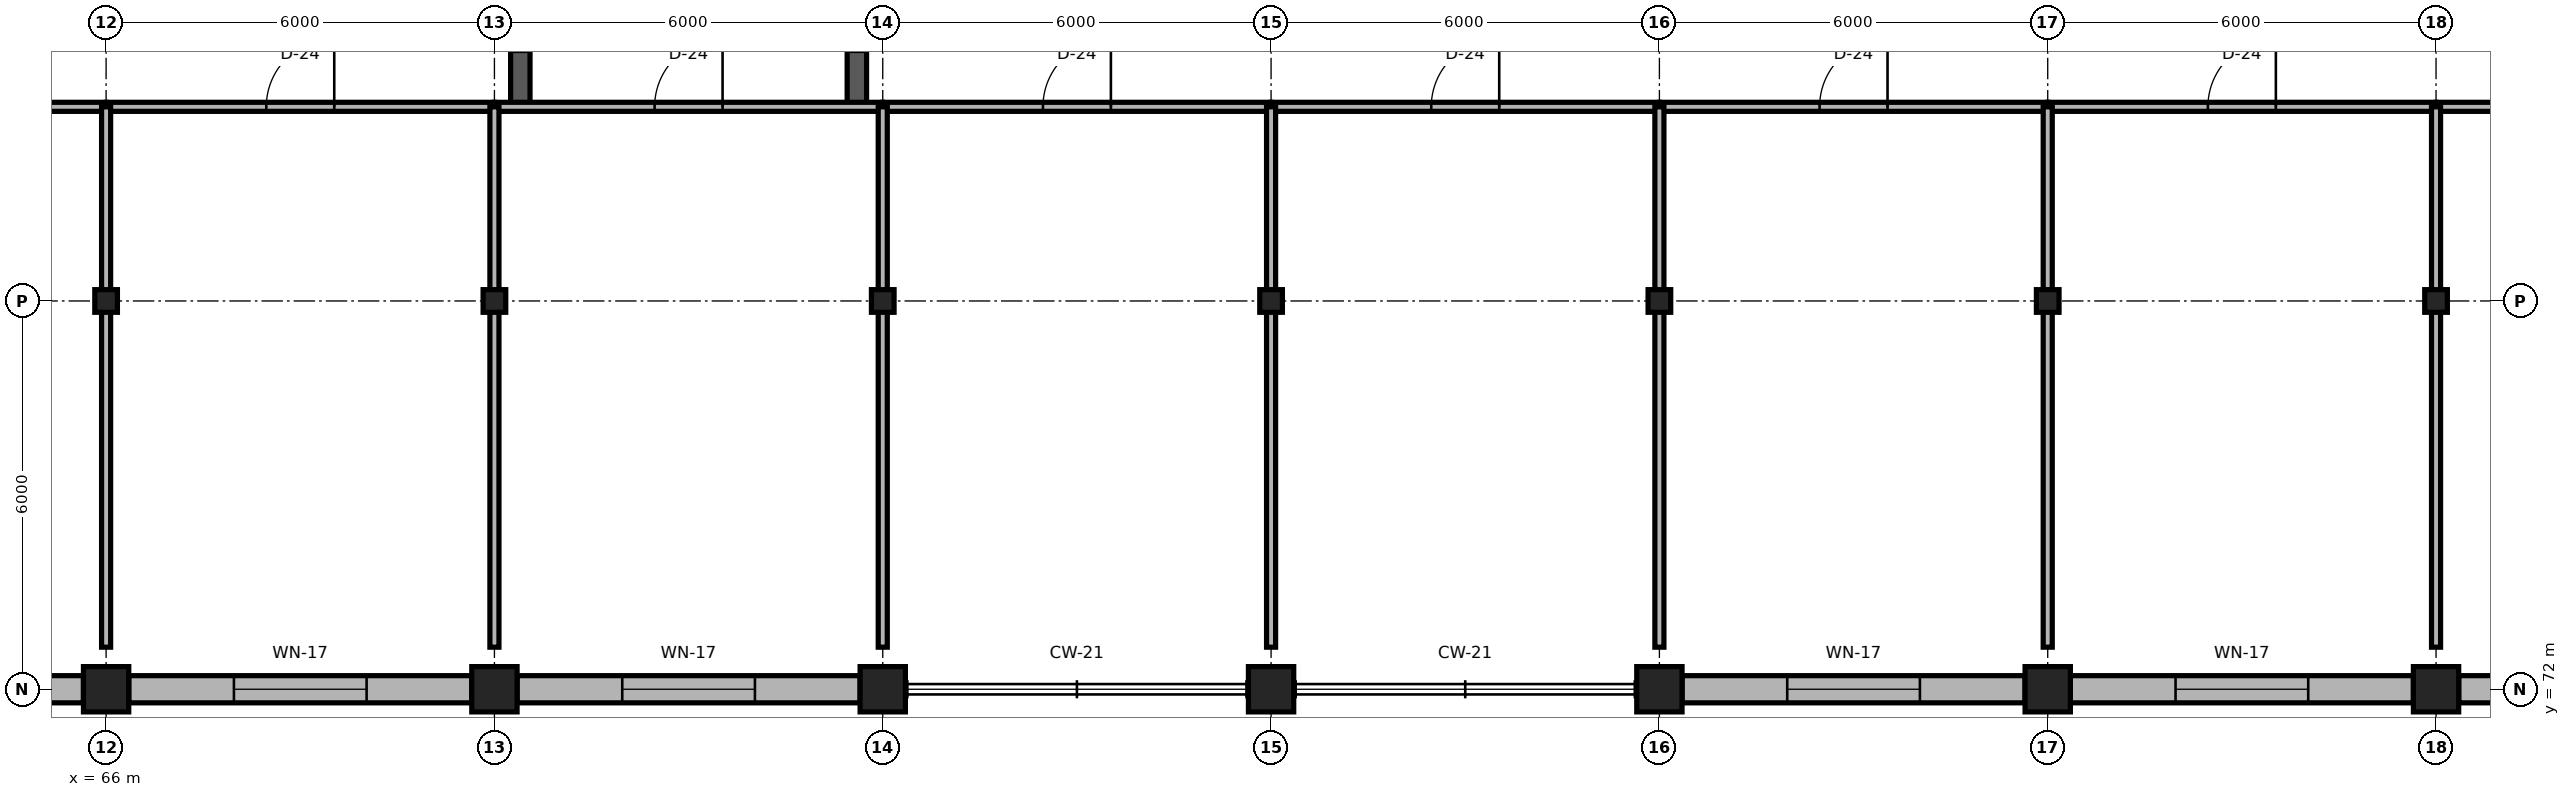
"""IFC4 building model, lengths in metres.
Left out: names, types, materials, properties, quantities, classifications, styles, units other than length and angle.
Written with IfcOpenShell. Run it as: python <this file> out.ifc"""

import sys

from ifc_helpers import new_model, si_unit, direction, frame, frame_2d, origin, origin_2d, place, context, subcontext, project, spatial, rectangle, i_section, extrude, element, fill, save


model = new_model("IFC4")
c1 = context("Model", 3, precision=1e-05, world=origin(), true_north=direction((0.0, 1.0)))
c2 = subcontext(c1, "Body", "Model", "MODEL_VIEW")
j1 = project(units=[si_unit("LENGTHUNIT", "METRE"), si_unit("PLANEANGLEUNIT", "RADIAN")], contexts=[c1])
p1 = place(None, origin())
s1 = spatial("IfcSite", under=j1, at=p1, CompositionType="ELEMENT")
p2 = place(p1, origin())
s2 = spatial("IfcBuilding", under=s1, at=p2, CompositionType="ELEMENT")
p3 = place(p2, frame((0.0, 0.0, 36.6)))
s3 = spatial("IfcBuildingStorey", under=s2, at=p3, CompositionType="ELEMENT", Elevation=36.6)
for number, where, z_axis, x_axis in (
    (1, (66.0, 72.0, 0.0), (0.0, 0.0, 1.0), (1.0, 0.0, 0.0)),
    (2, (72.0, 72.0, 0.0), (0.0, 0.0, 1.0), (1.0, 0.0, 0.0)),
    (3, (78.0, 72.0, 0.0), (0.0, 0.0, 1.0), (1.0, 0.0, 0.0)),
    (4, (84.0, 72.0, 0.0), (0.0, 0.0, 1.0), (1.0, 0.0, 0.0)),
    (5, (90.0, 72.0, 0.0), (0.0, 0.0, 1.0), (1.0, 0.0, 0.0)),
    (6, (96.0, 72.0, 0.0), (0.0, 0.0, 1.0), (1.0, 0.0, 0.0)),
    (7, (102.0, 72.0, 0.0), (0.0, 0.0, 1.0), (1.0, 0.0, 0.0)),
):
    element("IfcColumn", number, at=place(p3, frame(where, z_axis=z_axis, x_axis=x_axis)), inside=s3, PredefinedType="COLUMN", context=c2, shape_type="SweptSolid", body=[
        extrude(rectangle(XDim=0.7, YDim=0.7, at=origin_2d()), origin(), (0.0, 0.0, 1.0), 3.9),
    ])
for number, where, z_axis, x_axis in (
    (8, (66.0, 78.0, 0.0), (0.0, 0.0, 1.0), (1.0, 0.0, 0.0)),
    (9, (72.0, 78.0, 0.0), (0.0, 0.0, 1.0), (1.0, 0.0, 0.0)),
    (10, (78.0, 78.0, 0.0), (0.0, 0.0, 1.0), (1.0, 0.0, 0.0)),
    (11, (84.0, 78.0, 0.0), (0.0, 0.0, 1.0), (1.0, 0.0, 0.0)),
    (12, (90.0, 78.0, 0.0), (0.0, 0.0, 1.0), (1.0, 0.0, 0.0)),
    (13, (96.0, 78.0, 0.0), (0.0, 0.0, 1.0), (1.0, 0.0, 0.0)),
    (14, (102.0, 78.0, 0.0), (0.0, 0.0, 1.0), (1.0, 0.0, 0.0)),
):
    element("IfcColumn", number, at=place(p3, frame(where, z_axis=z_axis, x_axis=x_axis)), inside=s3, PredefinedType="COLUMN", context=c2, shape_type="SweptSolid", body=[
        extrude(i_section(OverallWidth=0.35, OverallDepth=0.35, WebThickness=0.012, FlangeThickness=0.019, FilletRadius=0.02, at=origin_2d()), origin(), (0.0, 0.0, 1.0), 3.9),
    ])
p4 = place(p3, frame((60.35, 72.0, 0.0), z_axis=(0.0, 0.0, 1.0), x_axis=(1.0, 0.0, 0.0)))
e15 = element("IfcWall", 15, at=p4, inside=s3, PredefinedType="SOLIDWALL", context=c2, shape_type="SweptSolid", body=[
    extrude(rectangle(XDim=5.3, YDim=0.42, at=frame_2d((2.65, 0.0))), origin(), (0.0, 0.0, 1.0), 3.32),
])
p5 = place(p4, frame((1.625, 0.0, 0.85)))
e16 = element("IfcOpeningElement", 16, at=p5, cuts=e15, PredefinedType="OPENING", context=c2, shape_type="SweptSolid", body=[
    extrude(rectangle(XDim=2.05, YDim=2.0, at=frame_2d((1.025, 1.0))), frame((0.0, 0.225, 0.0), z_axis=(0.0, -1.0, 0.0), x_axis=(1.0, 0.0, 0.0)), (0.0, 0.0, 1.0), 0.45),
])
p6 = place(p3, frame((66.35, 72.0, 0.0), z_axis=(0.0, 0.0, 1.0), x_axis=(1.0, 0.0, 0.0)))
e17 = element("IfcWall", 17, at=p6, inside=s3, PredefinedType="SOLIDWALL", context=c2, shape_type="SweptSolid", body=[
    extrude(rectangle(XDim=5.3, YDim=0.42, at=frame_2d((2.65, 0.0))), origin(), (0.0, 0.0, 1.0), 3.32),
])
p7 = place(p6, frame((1.625, 0.0, 0.85)))
e18 = element("IfcOpeningElement", 18, at=p7, cuts=e17, PredefinedType="OPENING", context=c2, shape_type="SweptSolid", body=[
    extrude(rectangle(XDim=2.05, YDim=2.0, at=frame_2d((1.025, 1.0))), frame((0.0, 0.225, 0.0), z_axis=(0.0, -1.0, 0.0), x_axis=(1.0, 0.0, 0.0)), (0.0, 0.0, 1.0), 0.45),
])
p8 = place(p3, frame((72.35, 72.0, 0.0), z_axis=(0.0, 0.0, 1.0), x_axis=(1.0, 0.0, 0.0)))
e19 = element("IfcWall", 19, at=p8, inside=s3, PredefinedType="SOLIDWALL", context=c2, shape_type="SweptSolid", body=[
    extrude(rectangle(XDim=5.3, YDim=0.42, at=frame_2d((2.65, 0.0))), origin(), (0.0, 0.0, 1.0), 3.32),
])
p9 = place(p8, frame((1.625, 0.0, 0.85)))
e20 = element("IfcOpeningElement", 20, at=p9, cuts=e19, PredefinedType="OPENING", context=c2, shape_type="SweptSolid", body=[
    extrude(rectangle(XDim=2.05, YDim=2.0, at=frame_2d((1.025, 1.0))), frame((0.0, 0.225, 0.0), z_axis=(0.0, -1.0, 0.0), x_axis=(1.0, 0.0, 0.0)), (0.0, 0.0, 1.0), 0.45),
])
p10 = place(p3, frame((90.35, 72.0, 0.0), z_axis=(0.0, 0.0, 1.0), x_axis=(1.0, 0.0, 0.0)))
e21 = element("IfcWall", 21, at=p10, inside=s3, PredefinedType="SOLIDWALL", context=c2, shape_type="SweptSolid", body=[
    extrude(rectangle(XDim=5.3, YDim=0.42, at=frame_2d((2.65, 0.0))), origin(), (0.0, 0.0, 1.0), 3.32),
])
p11 = place(p10, frame((1.625, 0.0, 0.85)))
e22 = element("IfcOpeningElement", 22, at=p11, cuts=e21, PredefinedType="OPENING", context=c2, shape_type="SweptSolid", body=[
    extrude(rectangle(XDim=2.05, YDim=2.0, at=frame_2d((1.025, 1.0))), frame((0.0, 0.225, 0.0), z_axis=(0.0, -1.0, 0.0), x_axis=(1.0, 0.0, 0.0)), (0.0, 0.0, 1.0), 0.45),
])
p12 = place(p3, frame((96.35, 72.0, 0.0), z_axis=(0.0, 0.0, 1.0), x_axis=(1.0, 0.0, 0.0)))
e23 = element("IfcWall", 23, at=p12, inside=s3, PredefinedType="SOLIDWALL", context=c2, shape_type="SweptSolid", body=[
    extrude(rectangle(XDim=5.3, YDim=0.42, at=frame_2d((2.65, 0.0))), origin(), (0.0, 0.0, 1.0), 3.32),
])
p13 = place(p12, frame((1.625, 0.0, 0.85)))
e24 = element("IfcOpeningElement", 24, at=p13, cuts=e23, PredefinedType="OPENING", context=c2, shape_type="SweptSolid", body=[
    extrude(rectangle(XDim=2.05, YDim=2.0, at=frame_2d((1.025, 1.0))), frame((0.0, 0.225, 0.0), z_axis=(0.0, -1.0, 0.0), x_axis=(1.0, 0.0, 0.0)), (0.0, 0.0, 1.0), 0.45),
])
p14 = place(p3, frame((102.35, 72.0, 0.0), z_axis=(0.0, 0.0, 1.0), x_axis=(1.0, 0.0, 0.0)))
e25 = element("IfcWall", 25, at=p14, inside=s3, PredefinedType="SOLIDWALL", context=c2, shape_type="SweptSolid", body=[
    extrude(rectangle(XDim=5.3, YDim=0.42, at=frame_2d((2.65, 0.0))), origin(), (0.0, 0.0, 1.0), 3.32),
])
p15 = place(p14, frame((1.625, 0.0, 0.85)))
e26 = element("IfcOpeningElement", 26, at=p15, cuts=e25, PredefinedType="OPENING", context=c2, shape_type="SweptSolid", body=[
    extrude(rectangle(XDim=2.05, YDim=2.0, at=frame_2d((1.025, 1.0))), frame((0.0, 0.225, 0.0), z_axis=(0.0, -1.0, 0.0), x_axis=(1.0, 0.0, 0.0)), (0.0, 0.0, 1.0), 0.45),
])
p16 = place(p3, frame((72.4, 81.0, 0.0), z_axis=(0.0, 0.0, 1.0), x_axis=(0.0, 1.0, 0.0)))
e27 = element("IfcWall", 27, at=p16, inside=s3, PredefinedType="SHEAR", context=c2, shape_type="SweptSolid", body=[
    extrude(rectangle(XDim=3.0, YDim=0.3, at=frame_2d((1.5, 0.0))), origin(), (0.0, 0.0, 1.0), 3.74),
])
p17 = place(p16, frame((0.85, 0.0, 0.0)))
e28 = element("IfcOpeningElement", 28, at=p17, cuts=e27, PredefinedType="OPENING", context=c2, shape_type="SweptSolid", body=[
    extrude(rectangle(XDim=1.3, YDim=2.2, at=frame_2d((0.65, 1.1))), frame((0.0, 0.165, 0.0), z_axis=(0.0, -1.0, 0.0), x_axis=(1.0, 0.0, 0.0)), (0.0, 0.0, 1.0), 0.33),
])
p18 = place(p3, frame((77.6, 81.0, 0.0), z_axis=(0.0, 0.0, 1.0), x_axis=(0.0, 1.0, 0.0)))
e29 = element("IfcWall", 29, at=p18, inside=s3, PredefinedType="SHEAR", context=c2, shape_type="SweptSolid", body=[
    extrude(rectangle(XDim=3.0, YDim=0.3, at=frame_2d((1.5, 0.0))), origin(), (0.0, 0.0, 1.0), 3.74),
])
p19 = place(p18, frame((0.85, 0.0, 0.0)))
e30 = element("IfcOpeningElement", 30, at=p19, cuts=e29, PredefinedType="OPENING", context=c2, shape_type="SweptSolid", body=[
    extrude(rectangle(XDim=1.3, YDim=2.2, at=frame_2d((0.65, 1.1))), frame((0.0, 0.165, 0.0), z_axis=(0.0, -1.0, 0.0), x_axis=(1.0, 0.0, 0.0)), (0.0, 0.0, 1.0), 0.33),
])
p20 = place(p3, frame((61.7, 81.0, 0.0), z_axis=(0.0, 0.0, 1.0), x_axis=(1.0, 0.0, 0.0)))
e31 = element("IfcWall", 31, at=p20, inside=s3, PredefinedType="PARTITIONING", context=c2, shape_type="SweptSolid", body=[
    extrude(rectangle(XDim=4.3, YDim=0.14, at=frame_2d((2.15, 0.0))), origin(), (0.0, 0.0, 1.0), 3.74),
])
p21 = place(p20, frame((1.625, 0.0, 0.0)))
e32 = element("IfcOpeningElement", 32, at=p21, cuts=e31, PredefinedType="OPENING", context=c2, shape_type="SweptSolid", body=[
    extrude(rectangle(XDim=1.05, YDim=2.25, at=frame_2d((0.525, 1.125))), frame((0.0, 0.085, 0.0), z_axis=(0.0, -1.0, 0.0), x_axis=(1.0, 0.0, 0.0)), (0.0, 0.0, 1.0), 0.17),
])
p22 = place(p3, frame((66.0, 81.0, 0.0), z_axis=(0.0, 0.0, 1.0), x_axis=(1.0, 0.0, 0.0)))
e33 = element("IfcWall", 33, at=p22, inside=s3, PredefinedType="PARTITIONING", context=c2, shape_type="SweptSolid", body=[
    extrude(rectangle(XDim=6.0, YDim=0.14, at=frame_2d((3.0, 0.0))), origin(), (0.0, 0.0, 1.0), 3.74),
])
p23 = place(p22, frame((2.475, 0.0, 0.0)))
e34 = element("IfcOpeningElement", 34, at=p23, cuts=e33, PredefinedType="OPENING", context=c2, shape_type="SweptSolid", body=[
    extrude(rectangle(XDim=1.05, YDim=2.25, at=frame_2d((0.525, 1.125))), frame((0.0, 0.085, 0.0), z_axis=(0.0, -1.0, 0.0), x_axis=(1.0, 0.0, 0.0)), (0.0, 0.0, 1.0), 0.17),
])
p24 = place(p3, frame((72.0, 81.0, 0.0), z_axis=(0.0, 0.0, 1.0), x_axis=(1.0, 0.0, 0.0)))
e35 = element("IfcWall", 35, at=p24, inside=s3, PredefinedType="PARTITIONING", context=c2, shape_type="SweptSolid", body=[
    extrude(rectangle(XDim=6.0, YDim=0.14, at=frame_2d((3.0, 0.0))), origin(), (0.0, 0.0, 1.0), 3.74),
])
p25 = place(p24, frame((2.475, 0.0, 0.0)))
e36 = element("IfcOpeningElement", 36, at=p25, cuts=e35, PredefinedType="OPENING", context=c2, shape_type="SweptSolid", body=[
    extrude(rectangle(XDim=1.05, YDim=2.25, at=frame_2d((0.525, 1.125))), frame((0.0, 0.085, 0.0), z_axis=(0.0, -1.0, 0.0), x_axis=(1.0, 0.0, 0.0)), (0.0, 0.0, 1.0), 0.17),
])
p26 = place(p3, frame((78.0, 81.0, 0.0), z_axis=(0.0, 0.0, 1.0), x_axis=(1.0, 0.0, 0.0)))
e37 = element("IfcWall", 37, at=p26, inside=s3, PredefinedType="PARTITIONING", context=c2, shape_type="SweptSolid", body=[
    extrude(rectangle(XDim=6.0, YDim=0.14, at=frame_2d((3.0, 0.0))), origin(), (0.0, 0.0, 1.0), 3.74),
])
p27 = place(p26, frame((2.475, 0.0, 0.0)))
e38 = element("IfcOpeningElement", 38, at=p27, cuts=e37, PredefinedType="OPENING", context=c2, shape_type="SweptSolid", body=[
    extrude(rectangle(XDim=1.05, YDim=2.25, at=frame_2d((0.525, 1.125))), frame((0.0, 0.085, 0.0), z_axis=(0.0, -1.0, 0.0), x_axis=(1.0, 0.0, 0.0)), (0.0, 0.0, 1.0), 0.17),
])
p28 = place(p3, frame((84.0, 81.0, 0.0), z_axis=(0.0, 0.0, 1.0), x_axis=(1.0, 0.0, 0.0)))
e39 = element("IfcWall", 39, at=p28, inside=s3, PredefinedType="PARTITIONING", context=c2, shape_type="SweptSolid", body=[
    extrude(rectangle(XDim=6.0, YDim=0.14, at=frame_2d((3.0, 0.0))), origin(), (0.0, 0.0, 1.0), 3.74),
])
p29 = place(p28, frame((2.475, 0.0, 0.0)))
e40 = element("IfcOpeningElement", 40, at=p29, cuts=e39, PredefinedType="OPENING", context=c2, shape_type="SweptSolid", body=[
    extrude(rectangle(XDim=1.05, YDim=2.25, at=frame_2d((0.525, 1.125))), frame((0.0, 0.085, 0.0), z_axis=(0.0, -1.0, 0.0), x_axis=(1.0, 0.0, 0.0)), (0.0, 0.0, 1.0), 0.17),
])
p30 = place(p3, frame((90.0, 81.0, 0.0), z_axis=(0.0, 0.0, 1.0), x_axis=(1.0, 0.0, 0.0)))
e41 = element("IfcWall", 41, at=p30, inside=s3, PredefinedType="PARTITIONING", context=c2, shape_type="SweptSolid", body=[
    extrude(rectangle(XDim=6.0, YDim=0.14, at=frame_2d((3.0, 0.0))), origin(), (0.0, 0.0, 1.0), 3.74),
])
p31 = place(p30, frame((2.475, 0.0, 0.0)))
e42 = element("IfcOpeningElement", 42, at=p31, cuts=e41, PredefinedType="OPENING", context=c2, shape_type="SweptSolid", body=[
    extrude(rectangle(XDim=1.05, YDim=2.25, at=frame_2d((0.525, 1.125))), frame((0.0, 0.085, 0.0), z_axis=(0.0, -1.0, 0.0), x_axis=(1.0, 0.0, 0.0)), (0.0, 0.0, 1.0), 0.17),
])
p32 = place(p3, frame((96.0, 81.0, 0.0), z_axis=(0.0, 0.0, 1.0), x_axis=(1.0, 0.0, 0.0)))
e43 = element("IfcWall", 43, at=p32, inside=s3, PredefinedType="PARTITIONING", context=c2, shape_type="SweptSolid", body=[
    extrude(rectangle(XDim=6.0, YDim=0.14, at=frame_2d((3.0, 0.0))), origin(), (0.0, 0.0, 1.0), 3.74),
])
p33 = place(p32, frame((2.475, 0.0, 0.0)))
e44 = element("IfcOpeningElement", 44, at=p33, cuts=e43, PredefinedType="OPENING", context=c2, shape_type="SweptSolid", body=[
    extrude(rectangle(XDim=1.05, YDim=2.25, at=frame_2d((0.525, 1.125))), frame((0.0, 0.085, 0.0), z_axis=(0.0, -1.0, 0.0), x_axis=(1.0, 0.0, 0.0)), (0.0, 0.0, 1.0), 0.17),
])
p34 = place(p3, frame((102.0, 81.0, 0.0), z_axis=(0.0, 0.0, 1.0), x_axis=(1.0, 0.0, 0.0)))
e45 = element("IfcWall", 45, at=p34, inside=s3, PredefinedType="PARTITIONING", context=c2, shape_type="SweptSolid", body=[
    extrude(rectangle(XDim=4.3, YDim=0.14, at=frame_2d((2.15, 0.0))), origin(), (0.0, 0.0, 1.0), 3.74),
])
p35 = place(p34, frame((1.625, 0.0, 0.0)))
e46 = element("IfcOpeningElement", 46, at=p35, cuts=e45, PredefinedType="OPENING", context=c2, shape_type="SweptSolid", body=[
    extrude(rectangle(XDim=1.05, YDim=2.25, at=frame_2d((0.525, 1.125))), frame((0.0, 0.085, 0.0), z_axis=(0.0, -1.0, 0.0), x_axis=(1.0, 0.0, 0.0)), (0.0, 0.0, 1.0), 0.17),
])
for number, where, z_axis, x_axis in (
    (47, (66.0, 72.65, 0.0), (0.0, 0.0, 1.0), (0.0, 1.0, 0.0)),
    (48, (72.0, 72.65, 0.0), (0.0, 0.0, 1.0), (0.0, 1.0, 0.0)),
    (49, (78.0, 72.65, 0.0), (0.0, 0.0, 1.0), (0.0, 1.0, 0.0)),
    (50, (84.0, 72.65, 0.0), (0.0, 0.0, 1.0), (0.0, 1.0, 0.0)),
    (51, (90.0, 72.65, 0.0), (0.0, 0.0, 1.0), (0.0, 1.0, 0.0)),
    (52, (96.0, 72.65, 0.0), (0.0, 0.0, 1.0), (0.0, 1.0, 0.0)),
    (53, (102.0, 72.65, 0.0), (0.0, 0.0, 1.0), (0.0, 1.0, 0.0)),
):
    element("IfcWall", number, at=place(p3, frame(where, z_axis=z_axis, x_axis=x_axis)), inside=s3, PredefinedType="PARTITIONING", context=c2, shape_type="SweptSolid", body=[
        extrude(rectangle(XDim=8.35, YDim=0.14, at=frame_2d((4.175, 0.0))), origin(), (0.0, 0.0, 1.0), 3.348),
    ])
p36 = place(p7, origin())
e54 = element("IfcWindow", 54, at=p36, inside=s3, PartitioningType="SINGLE_PANEL", PredefinedType="WINDOW", context=c2, shape_type="SweptSolid", body=[
    extrude(rectangle(XDim=2.05, YDim=2.0, at=frame_2d((1.025, 1.0))), frame((0.0, 0.03, 0.0), z_axis=(0.0, -1.0, 0.0), x_axis=(1.0, 0.0, 0.0)), (0.0, 0.0, 1.0), 0.06),
])
fill(e18, e54)
p37 = place(p9, origin())
e55 = element("IfcWindow", 55, at=p37, inside=s3, PartitioningType="SINGLE_PANEL", PredefinedType="WINDOW", context=c2, shape_type="SweptSolid", body=[
    extrude(rectangle(XDim=2.05, YDim=2.0, at=frame_2d((1.025, 1.0))), frame((0.0, 0.03, 0.0), z_axis=(0.0, -1.0, 0.0), x_axis=(1.0, 0.0, 0.0)), (0.0, 0.0, 1.0), 0.06),
])
fill(e20, e55)
p38 = place(p11, origin())
e56 = element("IfcWindow", 56, at=p38, inside=s3, PartitioningType="SINGLE_PANEL", PredefinedType="WINDOW", context=c2, shape_type="SweptSolid", body=[
    extrude(rectangle(XDim=2.05, YDim=2.0, at=frame_2d((1.025, 1.0))), frame((0.0, 0.03, 0.0), z_axis=(0.0, -1.0, 0.0), x_axis=(1.0, 0.0, 0.0)), (0.0, 0.0, 1.0), 0.06),
])
fill(e22, e56)
p39 = place(p13, origin())
e57 = element("IfcWindow", 57, at=p39, inside=s3, PartitioningType="SINGLE_PANEL", PredefinedType="WINDOW", context=c2, shape_type="SweptSolid", body=[
    extrude(rectangle(XDim=2.05, YDim=2.0, at=frame_2d((1.025, 1.0))), frame((0.0, 0.03, 0.0), z_axis=(0.0, -1.0, 0.0), x_axis=(1.0, 0.0, 0.0)), (0.0, 0.0, 1.0), 0.06),
])
fill(e24, e57)
p40 = place(p23, origin())
e58 = element("IfcDoor", 58, at=p40, inside=s3, OperationType="SINGLE_SWING_RIGHT", PredefinedType="DOOR", context=c2, shape_type="SweptSolid", body=[
    extrude(rectangle(XDim=1.05, YDim=2.25, at=frame_2d((0.525, 1.125))), frame((0.0, 0.025, 0.0), z_axis=(0.0, -1.0, 0.0), x_axis=(1.0, 0.0, 0.0)), (0.0, 0.0, 1.0), 0.05),
])
fill(e34, e58)
p41 = place(p25, origin())
e59 = element("IfcDoor", 59, at=p41, inside=s3, OperationType="SINGLE_SWING_RIGHT", PredefinedType="DOOR", context=c2, shape_type="SweptSolid", body=[
    extrude(rectangle(XDim=1.05, YDim=2.25, at=frame_2d((0.525, 1.125))), frame((0.0, 0.025, 0.0), z_axis=(0.0, -1.0, 0.0), x_axis=(1.0, 0.0, 0.0)), (0.0, 0.0, 1.0), 0.05),
])
fill(e36, e59)
p42 = place(p27, origin())
e60 = element("IfcDoor", 60, at=p42, inside=s3, OperationType="SINGLE_SWING_RIGHT", PredefinedType="DOOR", context=c2, shape_type="SweptSolid", body=[
    extrude(rectangle(XDim=1.05, YDim=2.25, at=frame_2d((0.525, 1.125))), frame((0.0, 0.025, 0.0), z_axis=(0.0, -1.0, 0.0), x_axis=(1.0, 0.0, 0.0)), (0.0, 0.0, 1.0), 0.05),
])
fill(e38, e60)
p43 = place(p29, origin())
e61 = element("IfcDoor", 61, at=p43, inside=s3, OperationType="SINGLE_SWING_RIGHT", PredefinedType="DOOR", context=c2, shape_type="SweptSolid", body=[
    extrude(rectangle(XDim=1.05, YDim=2.25, at=frame_2d((0.525, 1.125))), frame((0.0, 0.025, 0.0), z_axis=(0.0, -1.0, 0.0), x_axis=(1.0, 0.0, 0.0)), (0.0, 0.0, 1.0), 0.05),
])
fill(e40, e61)
p44 = place(p31, origin())
e62 = element("IfcDoor", 62, at=p44, inside=s3, OperationType="SINGLE_SWING_RIGHT", PredefinedType="DOOR", context=c2, shape_type="SweptSolid", body=[
    extrude(rectangle(XDim=1.05, YDim=2.25, at=frame_2d((0.525, 1.125))), frame((0.0, 0.025, 0.0), z_axis=(0.0, -1.0, 0.0), x_axis=(1.0, 0.0, 0.0)), (0.0, 0.0, 1.0), 0.05),
])
fill(e42, e62)
p45 = place(p33, origin())
e63 = element("IfcDoor", 63, at=p45, inside=s3, OperationType="SINGLE_SWING_RIGHT", PredefinedType="DOOR", context=c2, shape_type="SweptSolid", body=[
    extrude(rectangle(XDim=1.05, YDim=2.25, at=frame_2d((0.525, 1.125))), frame((0.0, 0.025, 0.0), z_axis=(0.0, -1.0, 0.0), x_axis=(1.0, 0.0, 0.0)), (0.0, 0.0, 1.0), 0.05),
])
fill(e44, e63)
save(model, sys.argv[1])
